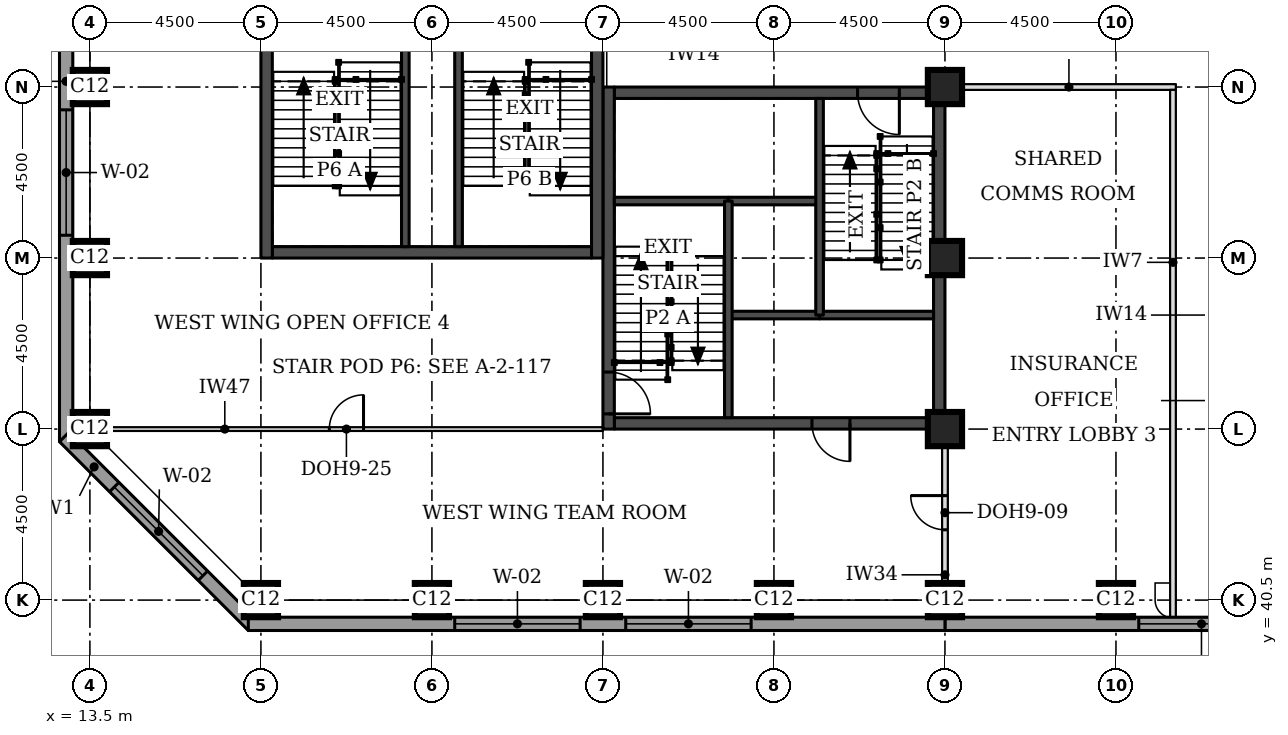
"""IFC4 building model, lengths in metres.
Left out: names, types, materials, properties, quantities, classifications, styles, units other than length and angle.
Written with IfcOpenShell. Run it as: python <this file> out.ifc"""

import sys

from ifc_helpers import new_model, si_unit, direction, frame, frame_2d, origin, origin_2d, place, context, subcontext, project, spatial, rectangle, extrude, element, fill, save


model = new_model("IFC4")
c1 = context("Model", 3, precision=1e-05, world=origin(), true_north=direction((0.0, 1.0)))
c2 = subcontext(c1, "Body", "Model", "MODEL_VIEW")
j1 = project(units=[si_unit("LENGTHUNIT", "METRE"), si_unit("PLANEANGLEUNIT", "RADIAN")], contexts=[c1])
p1 = place(None, origin())
s1 = spatial("IfcSite", under=j1, at=p1, CompositionType="ELEMENT")
p2 = place(p1, origin())
s2 = spatial("IfcBuilding", under=s1, at=p2, CompositionType="ELEMENT")
p3 = place(p2, frame((0.0, 0.0, 215.6)))
s3 = spatial("IfcBuildingStorey", under=s2, at=p3, CompositionType="ELEMENT", Elevation=215.6)
for number, where, z_axis, x_axis in (
    (1, (18.0, 40.5, 0.0), (0.0, 0.0, 1.0), (1.0, 0.0, 0.0)),
    (2, (22.5, 40.5, 0.0), (0.0, 0.0, 1.0), (1.0, 0.0, 0.0)),
    (3, (27.0, 40.5, 0.0), (0.0, 0.0, 1.0), (1.0, 0.0, 0.0)),
    (4, (31.5, 40.5, 0.0), (0.0, 0.0, 1.0), (1.0, 0.0, 0.0)),
    (5, (36.0, 40.5, 0.0), (0.0, 0.0, 1.0), (1.0, 0.0, 0.0)),
    (6, (40.5, 40.5, 0.0), (0.0, 0.0, 1.0), (1.0, 0.0, 0.0)),
    (7, (13.5, 45.0, 0.0), (0.0, 0.0, 1.0), (1.0, 0.0, 0.0)),
    (8, (36.0, 45.0, 0.0), (0.0, 0.0, 1.0), (1.0, 0.0, 0.0)),
    (9, (13.5, 49.5, 0.0), (0.0, 0.0, 1.0), (1.0, 0.0, 0.0)),
    (10, (36.0, 49.5, 0.0), (0.0, 0.0, 1.0), (1.0, 0.0, 0.0)),
    (11, (13.5, 54.0, 0.0), (0.0, 0.0, 1.0), (1.0, 0.0, 0.0)),
    (12, (36.0, 54.0, 0.0), (0.0, 0.0, 1.0), (1.0, 0.0, 0.0)),
):
    element("IfcColumn", number, at=place(p3, frame(where, z_axis=z_axis, x_axis=x_axis)), inside=s3, PredefinedType="COLUMN", context=c2, shape_type="SweptSolid", body=[
        extrude(rectangle(XDim=0.9, YDim=0.9, at=origin_2d()), origin(), (0.0, 0.0, 1.0), 3.7),
    ])
p4 = place(p3, frame((27.3, 45.15, 0.0), z_axis=(0.0, 0.0, 1.0), x_axis=(1.0, 0.0, 0.0)))
e13 = element("IfcWall", 13, at=p4, inside=s3, PredefinedType="SHEAR", context=c2, shape_type="SweptSolid", body=[
    extrude(rectangle(XDim=8.4, YDim=0.3, at=frame_2d((4.2, 0.0))), origin(), (0.0, 0.0, 1.0), 3.7),
])
p5 = place(p4, frame((5.2, 0.0, 0.0)))
e14 = element("IfcOpeningElement", 14, at=p5, cuts=e13, PredefinedType="OPENING", context=c2, shape_type="SweptSolid", body=[
    extrude(rectangle(XDim=1.0, YDim=2.1, at=frame_2d((0.5, 1.05))), frame((0.0, 0.16, 0.0), z_axis=(0.0, -1.0, 0.0), x_axis=(1.0, 0.0, 0.0)), (0.0, 0.0, 1.0), 0.32),
])
p6 = place(p3, frame((27.3, 53.85, 0.0), z_axis=(0.0, 0.0, 1.0), x_axis=(1.0, 0.0, 0.0)))
e15 = element("IfcWall", 15, at=p6, inside=s3, PredefinedType="SHEAR", context=c2, shape_type="SweptSolid", body=[
    extrude(rectangle(XDim=8.4, YDim=0.3, at=frame_2d((4.2, 0.0))), origin(), (0.0, 0.0, 1.0), 3.7),
])
p7 = place(p6, frame((6.4, 0.0, 0.0)))
e16 = element("IfcOpeningElement", 16, at=p7, cuts=e15, PredefinedType="OPENING", context=c2, shape_type="SweptSolid", body=[
    extrude(rectangle(XDim=1.1, YDim=2.1, at=frame_2d((0.55, 1.05))), frame((0.0, 0.16, 0.0), z_axis=(0.0, -1.0, 0.0), x_axis=(1.0, 0.0, 0.0)), (0.0, 0.0, 1.0), 0.32),
])
p8 = place(p3, frame((27.15, 45.0, 0.0), z_axis=(0.0, 0.0, 1.0), x_axis=(0.0, 1.0, 0.0)))
e17 = element("IfcWall", 17, at=p8, inside=s3, PredefinedType="SHEAR", context=c2, shape_type="SweptSolid", body=[
    extrude(rectangle(XDim=9.0, YDim=0.3, at=frame_2d((4.5, 0.0))), origin(), (0.0, 0.0, 1.0), 3.7),
])
p9 = place(p8, frame((0.4, 0.0, 0.0)))
e18 = element("IfcOpeningElement", 18, at=p9, cuts=e17, PredefinedType="OPENING", context=c2, shape_type="SweptSolid", body=[
    extrude(rectangle(XDim=1.1, YDim=2.1, at=frame_2d((0.55, 1.05))), frame((0.0, 0.16, 0.0), z_axis=(0.0, -1.0, 0.0), x_axis=(1.0, 0.0, 0.0)), (0.0, 0.0, 1.0), 0.32),
])
p10 = place(p3, frame((35.85, 45.0, 0.0), z_axis=(0.0, 0.0, 1.0), x_axis=(0.0, 1.0, 0.0)))
e19 = element("IfcWall", 19, at=p10, inside=s3, PredefinedType="SHEAR", context=c2, shape_type="SweptSolid", body=[
    extrude(rectangle(XDim=9.0, YDim=0.3, at=frame_2d((4.5, 0.0))), origin(), (0.0, 0.0, 1.0), 3.7),
])
p11 = place(p3, frame((18.3, 49.65, 0.0), z_axis=(0.0, 0.0, 1.0), x_axis=(1.0, 0.0, 0.0)))
e20 = element("IfcWall", 20, at=p11, inside=s3, PredefinedType="SHEAR", context=c2, shape_type="SweptSolid", body=[
    extrude(rectangle(XDim=8.4, YDim=0.3, at=frame_2d((4.2, 0.0))), origin(), (0.0, 0.0, 1.0), 3.7),
])
p12 = place(p3, frame((18.15, 49.5, 0.0), z_axis=(0.0, 0.0, 1.0), x_axis=(0.0, 1.0, 0.0)))
e21 = element("IfcWall", 21, at=p12, inside=s3, PredefinedType="SHEAR", context=c2, shape_type="SweptSolid", body=[
    extrude(rectangle(XDim=9.0, YDim=0.3, at=frame_2d((4.5, 0.0))), origin(), (0.0, 0.0, 1.0), 3.7),
])
p13 = place(p3, frame((26.85, 49.5, 0.0), z_axis=(0.0, 0.0, 1.0), x_axis=(0.0, 1.0, 0.0)))
e22 = element("IfcWall", 22, at=p13, inside=s3, PredefinedType="SHEAR", context=c2, shape_type="SweptSolid", body=[
    extrude(rectangle(XDim=9.0, YDim=0.3, at=frame_2d((4.5, 0.0))), origin(), (0.0, 0.0, 1.0), 3.7),
])
p14 = place(p13, frame((6.6, 0.0, 0.0)))
e23 = element("IfcOpeningElement", 23, at=p14, cuts=e22, PredefinedType="OPENING", context=c2, shape_type="SweptSolid", body=[
    extrude(rectangle(XDim=1.8, YDim=2.1, at=frame_2d((0.9, 1.05))), frame((0.0, 0.16, 0.0), z_axis=(0.0, -1.0, 0.0), x_axis=(1.0, 0.0, 0.0)), (0.0, 0.0, 1.0), 0.32),
])
p15 = place(p3, frame((36.0, 39.875, 0.0), z_axis=(0.0, 0.0, 1.0), x_axis=(1.0, 0.0, 0.0)))
e24 = element("IfcWall", 24, at=p15, inside=s3, PredefinedType="STANDARD", context=c2, shape_type="SweptSolid", body=[
    extrude(rectangle(XDim=36.331, YDim=0.35, at=frame_2d((18.166, 0.0))), origin(), (0.0, 0.0, 1.0), 3.525),
])
p16 = place(p15, frame((5.1, 0.0, 0.9)))
e25 = element("IfcOpeningElement", 25, at=p16, cuts=e24, PredefinedType="OPENING", context=c2, shape_type="SweptSolid", body=[
    extrude(rectangle(XDim=3.3, YDim=1.9, at=frame_2d((1.65, 0.95))), frame((0.0, 0.185, 0.0), z_axis=(0.0, -1.0, 0.0), x_axis=(1.0, 0.0, 0.0)), (0.0, 0.0, 1.0), 0.37),
])
p17 = place(p15, frame((9.6, 0.0, 0.9)))
e26 = element("IfcOpeningElement", 26, at=p17, cuts=e24, PredefinedType="OPENING", context=c2, shape_type="SweptSolid", body=[
    extrude(rectangle(XDim=3.3, YDim=1.9, at=frame_2d((1.65, 0.95))), frame((0.0, 0.185, 0.0), z_axis=(0.0, -1.0, 0.0), x_axis=(1.0, 0.0, 0.0)), (0.0, 0.0, 1.0), 0.37),
])
p18 = place(p15, frame((14.1, 0.0, 0.9)))
e27 = element("IfcOpeningElement", 27, at=p18, cuts=e24, PredefinedType="OPENING", context=c2, shape_type="SweptSolid", body=[
    extrude(rectangle(XDim=3.3, YDim=1.9, at=frame_2d((1.65, 0.95))), frame((0.0, 0.185, 0.0), z_axis=(0.0, -1.0, 0.0), x_axis=(1.0, 0.0, 0.0)), (0.0, 0.0, 1.0), 0.37),
])
p19 = place(p15, frame((18.6, 0.0, 0.9)))
e28 = element("IfcOpeningElement", 28, at=p19, cuts=e24, PredefinedType="OPENING", context=c2, shape_type="SweptSolid", body=[
    extrude(rectangle(XDim=3.3, YDim=1.9, at=frame_2d((1.65, 0.95))), frame((0.0, 0.185, 0.0), z_axis=(0.0, -1.0, 0.0), x_axis=(1.0, 0.0, 0.0)), (0.0, 0.0, 1.0), 0.37),
])
p20 = place(p15, frame((23.1, 0.0, 0.9)))
e29 = element("IfcOpeningElement", 29, at=p20, cuts=e24, PredefinedType="OPENING", context=c2, shape_type="SweptSolid", body=[
    extrude(rectangle(XDim=3.3, YDim=1.9, at=frame_2d((1.65, 0.95))), frame((0.0, 0.185, 0.0), z_axis=(0.0, -1.0, 0.0), x_axis=(1.0, 0.0, 0.0)), (0.0, 0.0, 1.0), 0.37),
])
p21 = place(p15, frame((27.6, 0.0, 0.9)))
e30 = element("IfcOpeningElement", 30, at=p21, cuts=e24, PredefinedType="OPENING", context=c2, shape_type="SweptSolid", body=[
    extrude(rectangle(XDim=3.3, YDim=1.9, at=frame_2d((1.65, 0.95))), frame((0.0, 0.185, 0.0), z_axis=(0.0, -1.0, 0.0), x_axis=(1.0, 0.0, 0.0)), (0.0, 0.0, 1.0), 0.37),
])
p22 = place(p3, frame((12.875, 58.831, 0.0), z_axis=(0.0, 0.0, 1.0), x_axis=(0.0, -1.0, 0.0)))
e31 = element("IfcWall", 31, at=p22, inside=s3, PredefinedType="STANDARD", context=c2, shape_type="SweptSolid", body=[
    extrude(rectangle(XDim=14.163, YDim=0.35, at=frame_2d((7.081, 0.0))), origin(), (0.0, 0.0, 1.0), 3.525),
])
p23 = place(p22, frame((5.431, 0.0, 0.9)))
e32 = element("IfcOpeningElement", 32, at=p23, cuts=e31, PredefinedType="OPENING", context=c2, shape_type="SweptSolid", body=[
    extrude(rectangle(XDim=3.3, YDim=1.9, at=frame_2d((1.65, 0.95))), frame((0.0, 0.185, 0.0), z_axis=(0.0, -1.0, 0.0), x_axis=(1.0, 0.0, 0.0)), (0.0, 0.0, 1.0), 0.37),
])
p24 = place(p3, frame((12.824, 44.792, 0.0), z_axis=(0.0, 0.0, 1.0), x_axis=(0.707106781187, -0.707106781187, 0.0)))
e33 = element("IfcWall", 33, at=p24, inside=s3, PredefinedType="STANDARD", context=c2, shape_type="SweptSolid", body=[
    extrude(rectangle(XDim=7.027, YDim=0.35, at=frame_2d((3.513, 0.0))), origin(), (0.0, 0.0, 1.0), 3.525),
])
p25 = place(p24, frame((1.863, 0.0, 0.9)))
e34 = element("IfcOpeningElement", 34, at=p25, cuts=e33, PredefinedType="OPENING", context=c2, shape_type="SweptSolid", body=[
    extrude(rectangle(XDim=3.3, YDim=1.9, at=frame_2d((1.65, 0.95))), frame((0.0, 0.185, 0.0), z_axis=(0.0, -1.0, 0.0), x_axis=(1.0, 0.0, 0.0)), (0.0, 0.0, 1.0), 0.37),
])
p26 = place(p3, frame((17.669, 39.875, 0.0), z_axis=(0.0, 0.0, 1.0), x_axis=(1.0, 0.0, 0.0)))
e35 = element("IfcWall", 35, at=p26, inside=s3, PredefinedType="STANDARD", context=c2, shape_type="SweptSolid", body=[
    extrude(rectangle(XDim=18.331, YDim=0.35, at=frame_2d((9.166, 0.0))), origin(), (0.0, 0.0, 1.0), 3.525),
])
p27 = place(p26, frame((5.431, 0.0, 0.9)))
e36 = element("IfcOpeningElement", 36, at=p27, cuts=e35, PredefinedType="OPENING", context=c2, shape_type="SweptSolid", body=[
    extrude(rectangle(XDim=3.3, YDim=1.9, at=frame_2d((1.65, 0.95))), frame((0.0, 0.185, 0.0), z_axis=(0.0, -1.0, 0.0), x_axis=(1.0, 0.0, 0.0)), (0.0, 0.0, 1.0), 0.37),
])
p28 = place(p26, frame((9.931, 0.0, 0.9)))
e37 = element("IfcOpeningElement", 37, at=p28, cuts=e35, PredefinedType="OPENING", context=c2, shape_type="SweptSolid", body=[
    extrude(rectangle(XDim=3.3, YDim=1.9, at=frame_2d((1.65, 0.95))), frame((0.0, 0.185, 0.0), z_axis=(0.0, -1.0, 0.0), x_axis=(1.0, 0.0, 0.0)), (0.0, 0.0, 1.0), 0.37),
])
p29 = place(p3, frame((36.45, 54.0, 0.0), z_axis=(0.0, 0.0, 1.0), x_axis=(1.0, 0.0, 0.0)))
e38 = element("IfcWall", 38, at=p29, inside=s3, PredefinedType="PARTITIONING", context=c2, shape_type="SweptSolid", body=[
    extrude(rectangle(XDim=5.625, YDim=0.15, at=frame_2d((2.812, 0.0))), origin(), (0.0, 0.0, 1.0), 3.55),
])
p30 = place(p3, frame((42.0, 40.05, 0.0), z_axis=(0.0, 0.0, 1.0), x_axis=(0.0, 1.0, 0.0)))
e39 = element("IfcWall", 39, at=p30, inside=s3, PredefinedType="PARTITIONING", context=c2, shape_type="SweptSolid", body=[
    extrude(rectangle(XDim=13.875, YDim=0.15, at=frame_2d((6.938, 0.0))), origin(), (0.0, 0.0, 1.0), 3.55),
])
p31 = place(p3, frame((36.0, 40.95, 0.0), z_axis=(0.0, 0.0, 1.0), x_axis=(0.0, 1.0, 0.0)))
e40 = element("IfcWall", 40, at=p31, inside=s3, PredefinedType="PARTITIONING", context=c2, shape_type="SweptSolid", body=[
    extrude(rectangle(XDim=3.63, YDim=0.15, at=frame_2d((1.815, 0.0))), origin(), (0.0, 0.0, 1.0), 2.8),
])
p32 = place(p31, frame((1.4, 0.0, 0.0)))
e41 = element("IfcOpeningElement", 41, at=p32, cuts=e40, PredefinedType="OPENING", context=c2, shape_type="SweptSolid", body=[
    extrude(rectangle(XDim=0.9, YDim=2.1, at=frame_2d((0.45, 1.05))), frame((0.0, 0.085, 0.0), z_axis=(0.0, -1.0, 0.0), x_axis=(1.0, 0.0, 0.0)), (0.0, 0.0, 1.0), 0.17),
])
p33 = place(p3, frame((13.5, 45.0, 0.0), z_axis=(0.0, 0.0, 1.0), x_axis=(1.0, 0.0, 0.0)))
e42 = element("IfcWall", 42, at=p33, inside=s3, PredefinedType="PARTITIONING", context=c2, shape_type="SweptSolid", body=[
    extrude(rectangle(XDim=13.5, YDim=0.1, at=frame_2d((6.75, 0.0))), origin(), (0.0, 0.0, 1.0), 2.55),
])
p34 = place(p33, frame((6.3, 0.0, 0.0)))
e43 = element("IfcOpeningElement", 43, at=p34, cuts=e42, PredefinedType="OPENING", context=c2, shape_type="SweptSolid", body=[
    extrude(rectangle(XDim=0.9, YDim=2.1, at=frame_2d((0.45, 1.05))), frame((0.0, 0.06, 0.0), z_axis=(0.0, -1.0, 0.0), x_axis=(1.0, 0.0, 0.0)), (0.0, 0.0, 1.0), 0.12),
])
p35 = place(p3, frame((30.3, 48.0, 0.0), z_axis=(0.0, 0.0, 1.0), x_axis=(1.0, 0.0, 0.0)))
e44 = element("IfcWall", 44, at=p35, inside=s3, PredefinedType="SOLIDWALL", context=c2, shape_type="SweptSolid", body=[
    extrude(rectangle(XDim=2.4, YDim=0.2, at=frame_2d((1.2, 0.0))), origin(), (0.0, 0.0, 1.0), 3.55),
])
p36 = place(p3, frame((32.7, 48.0, 0.0), z_axis=(0.0, 0.0, 1.0), x_axis=(1.0, 0.0, 0.0)))
e45 = element("IfcWall", 45, at=p36, inside=s3, PredefinedType="SOLIDWALL", context=c2, shape_type="SweptSolid", body=[
    extrude(rectangle(XDim=3.0, YDim=0.2, at=frame_2d((1.5, 0.0))), origin(), (0.0, 0.0, 1.0), 3.55),
])
p37 = place(p3, frame((30.3, 51.0, 0.0), z_axis=(0.0, 0.0, 1.0), x_axis=(1.0, 0.0, 0.0)))
e46 = element("IfcWall", 46, at=p37, inside=s3, PredefinedType="SOLIDWALL", context=c2, shape_type="SweptSolid", body=[
    extrude(rectangle(XDim=2.4, YDim=0.2, at=frame_2d((1.2, 0.0))), origin(), (0.0, 0.0, 1.0), 3.7),
])
p38 = place(p3, frame((27.3, 51.0, 0.0), z_axis=(0.0, 0.0, 1.0), x_axis=(1.0, 0.0, 0.0)))
e47 = element("IfcWall", 47, at=p38, inside=s3, PredefinedType="SOLIDWALL", context=c2, shape_type="SweptSolid", body=[
    extrude(rectangle(XDim=3.0, YDim=0.2, at=frame_2d((1.5, 0.0))), origin(), (0.0, 0.0, 1.0), 3.55),
])
for number, where, z_axis, x_axis in (
    (48, (30.3, 45.3, 0.0), (0.0, 0.0, 1.0), (0.0, 1.0, 0.0)),
    (49, (32.7, 48.0, 0.0), (0.0, 0.0, 1.0), (0.0, 1.0, 0.0)),
):
    element("IfcWall", number, at=place(p3, frame(where, z_axis=z_axis, x_axis=x_axis)), inside=s3, PredefinedType="SOLIDWALL", context=c2, shape_type="SweptSolid", body=[
        extrude(rectangle(XDim=5.7, YDim=0.2, at=frame_2d((2.85, 0.0))), origin(), (0.0, 0.0, 1.0), 3.55),
    ])
for number, where, z_axis, x_axis in (
    (50, (21.8, 49.8, 0.0), (0.0, 0.0, 1.0), (0.0, 1.0, 0.0)),
    (51, (23.2, 49.8, 0.0), (0.0, 0.0, 1.0), (0.0, 1.0, 0.0)),
):
    element("IfcWall", number, at=place(p3, frame(where, z_axis=z_axis, x_axis=x_axis)), inside=s3, PredefinedType="SOLIDWALL", context=c2, shape_type="SweptSolid", body=[
        extrude(rectangle(XDim=6.05, YDim=0.2, at=frame_2d((3.025, 0.0))), origin(), (0.0, 0.0, 1.0), 3.55),
    ])
p39 = place(p16, origin())
e52 = element("IfcWindow", 52, at=p39, inside=s3, PartitioningType="SINGLE_PANEL", PredefinedType="WINDOW", context=c2, shape_type="SweptSolid", body=[
    extrude(rectangle(XDim=3.3, YDim=1.9, at=frame_2d((1.65, 0.95))), frame((0.0, 0.085, 0.0), z_axis=(0.0, -1.0, 0.0), x_axis=(1.0, 0.0, 0.0)), (0.0, 0.0, 1.0), 0.06),
])
fill(e25, e52)
p40 = place(p23, origin())
e53 = element("IfcWindow", 53, at=p40, inside=s3, PartitioningType="SINGLE_PANEL", PredefinedType="WINDOW", context=c2, shape_type="SweptSolid", body=[
    extrude(rectangle(XDim=3.3, YDim=1.9, at=frame_2d((1.65, 0.95))), frame((0.0, 0.085, 0.0), z_axis=(0.0, -1.0, 0.0), x_axis=(1.0, 0.0, 0.0)), (0.0, 0.0, 1.0), 0.06),
])
fill(e32, e53)
p41 = place(p25, origin())
e54 = element("IfcWindow", 54, at=p41, inside=s3, PartitioningType="SINGLE_PANEL", PredefinedType="WINDOW", context=c2, shape_type="SweptSolid", body=[
    extrude(rectangle(XDim=3.3, YDim=1.9, at=frame_2d((1.65, 0.95))), frame((0.0, 0.085, 0.0), z_axis=(0.0, -1.0, 0.0), x_axis=(1.0, 0.0, 0.0)), (0.0, 0.0, 1.0), 0.06),
])
fill(e34, e54)
p42 = place(p27, origin())
e55 = element("IfcWindow", 55, at=p42, inside=s3, PartitioningType="SINGLE_PANEL", PredefinedType="WINDOW", context=c2, shape_type="SweptSolid", body=[
    extrude(rectangle(XDim=3.3, YDim=1.9, at=frame_2d((1.65, 0.95))), frame((0.0, 0.085, 0.0), z_axis=(0.0, -1.0, 0.0), x_axis=(1.0, 0.0, 0.0)), (0.0, 0.0, 1.0), 0.06),
])
fill(e36, e55)
p43 = place(p28, origin())
e56 = element("IfcWindow", 56, at=p43, inside=s3, PartitioningType="SINGLE_PANEL", PredefinedType="WINDOW", context=c2, shape_type="SweptSolid", body=[
    extrude(rectangle(XDim=3.3, YDim=1.9, at=frame_2d((1.65, 0.95))), frame((0.0, 0.085, 0.0), z_axis=(0.0, -1.0, 0.0), x_axis=(1.0, 0.0, 0.0)), (0.0, 0.0, 1.0), 0.06),
])
fill(e37, e56)
p44 = place(p32, origin())
e57 = element("IfcDoor", 57, at=p44, inside=s3, OperationType="SINGLE_SWING_RIGHT", PredefinedType="DOOR", context=c2, shape_type="SweptSolid", body=[
    extrude(rectangle(XDim=0.9, YDim=2.1, at=frame_2d((0.45, 1.05))), frame((0.0, 0.025, 0.0), z_axis=(0.0, -1.0, 0.0), x_axis=(1.0, 0.0, 0.0)), (0.0, 0.0, 1.0), 0.05),
])
fill(e41, e57)
p45 = place(p34, origin())
e58 = element("IfcDoor", 58, at=p45, inside=s3, OperationType="SINGLE_SWING_RIGHT", PredefinedType="DOOR", context=c2, shape_type="SweptSolid", body=[
    extrude(rectangle(XDim=0.9, YDim=2.1, at=frame_2d((0.45, 1.05))), frame((0.0, 0.025, 0.0), z_axis=(0.0, -1.0, 0.0), x_axis=(1.0, 0.0, 0.0)), (0.0, 0.0, 1.0), 0.05),
])
fill(e43, e58)
p46 = place(p9, frame((1.1, 0.0, 0.0), z_axis=(0.0, 0.0, 1.0), x_axis=(-1.0, 0.0, 0.0)))
e59 = element("IfcDoor", 59, at=p46, inside=s3, OperationType="SINGLE_SWING_RIGHT", PredefinedType="DOOR", context=c2, shape_type="SweptSolid", body=[
    extrude(rectangle(XDim=1.1, YDim=2.1, at=frame_2d((0.55, 1.05))), frame((0.0, 0.025, 0.0), z_axis=(0.0, -1.0, 0.0), x_axis=(1.0, 0.0, 0.0)), (0.0, 0.0, 1.0), 0.05),
])
fill(e18, e59)
p47 = place(p7, frame((1.1, 0.0, 0.0), z_axis=(0.0, 0.0, 1.0), x_axis=(-1.0, 0.0, 0.0)))
e60 = element("IfcDoor", 60, at=p47, inside=s3, OperationType="SINGLE_SWING_LEFT", PredefinedType="DOOR", context=c2, shape_type="SweptSolid", body=[
    extrude(rectangle(XDim=1.1, YDim=2.1, at=frame_2d((0.55, 1.05))), frame((0.0, 0.025, 0.0), z_axis=(0.0, -1.0, 0.0), x_axis=(1.0, 0.0, 0.0)), (0.0, 0.0, 1.0), 0.05),
])
fill(e16, e60)
p48 = place(p5, frame((1.0, 0.0, 0.0), z_axis=(0.0, 0.0, 1.0), x_axis=(-1.0, 0.0, 0.0)))
e61 = element("IfcDoor", 61, at=p48, inside=s3, OperationType="SINGLE_SWING_LEFT", PredefinedType="DOOR", context=c2, shape_type="SweptSolid", body=[
    extrude(rectangle(XDim=1.0, YDim=2.1, at=frame_2d((0.5, 1.05))), frame((0.0, 0.025, 0.0), z_axis=(0.0, -1.0, 0.0), x_axis=(1.0, 0.0, 0.0)), (0.0, 0.0, 1.0), 0.05),
])
fill(e14, e61)
save(model, sys.argv[1])
